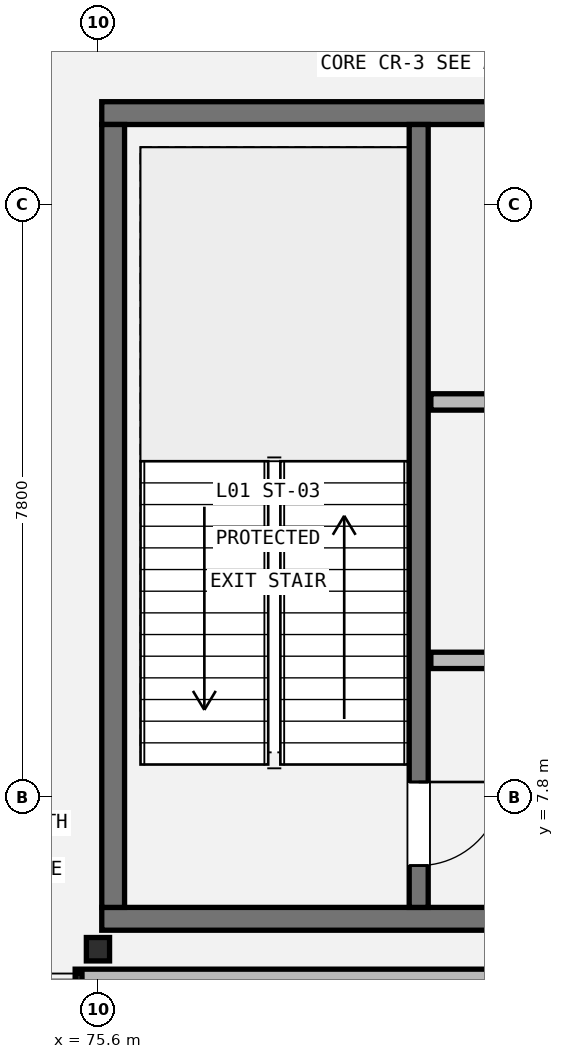
"""IFC4 building model, lengths in metres.
Left out: names, types, materials, properties, quantities, classifications, styles, units other than length and angle.
Written with IfcOpenShell. Run it as: python <this file> out.ifc"""

import sys

from ifc_helpers import new_model, si_unit, direction, frame, frame_2d, origin, origin_2d, place, context, subcontext, project, spatial, rectangle, i_section, extrude, element, fill, save


model = new_model("IFC4")
c1 = context("Model", 3, precision=1e-05, world=origin(), true_north=direction((0.0, 1.0)))
c2 = subcontext(c1, "Body", "Model", "MODEL_VIEW")
j1 = project(units=[si_unit("LENGTHUNIT", "METRE"), si_unit("PLANEANGLEUNIT", "RADIAN")], contexts=[c1])
p1 = place(None, origin())
s1 = spatial("IfcSite", under=j1, at=p1, CompositionType="ELEMENT")
p2 = place(p1, origin())
s2 = spatial("IfcBuilding", under=s1, at=p2, CompositionType="ELEMENT")
p3 = place(p2, frame((0.0, 0.0, 5.4)))
s3 = spatial("IfcBuildingStorey", under=s2, at=p3, CompositionType="ELEMENT", Elevation=5.4)
p4 = place(p3, frame((75.6, 5.8, 0.0), z_axis=(0.0, 0.0, 1.0), x_axis=(1.0, 0.0, 0.0)))
e1 = element("IfcColumn", 1, at=p4, inside=s3, PredefinedType="COLUMN", context=c2, shape_type="SweptSolid", body=[
    extrude(i_section(OverallWidth=0.305, OverallDepth=0.308, WebThickness=0.01, FlangeThickness=0.015, FilletRadius=0.015, at=origin_2d()), origin(), (0.0, 0.0, 1.0), 4.8),
])
p5 = place(p3, frame((84.3, 5.4, 0.0), z_axis=(0.0, 0.0, 1.0), x_axis=(-1.0, 0.0, 0.0)))
e2 = element("IfcWall", 2, at=p5, inside=s3, PredefinedType="STANDARD", context=c2, shape_type="SweptSolid", body=[
    extrude(rectangle(XDim=9.0, YDim=0.275, at=frame_2d((4.5, 0.0))), origin(), (0.0, 0.0, 1.0), 4.013),
])
for number, where, z_axis, x_axis in (
    (3, (84.15, 6.2, 0.0), (0.0, 0.0, 1.0), (-1.0, 0.0, 0.0)),
    (4, (75.65, 16.8, 0.0), (0.0, 0.0, 1.0), (1.0, 0.0, 0.0)),
):
    element("IfcWall", number, at=place(p3, frame(where, z_axis=z_axis, x_axis=x_axis)), inside=s3, PredefinedType="SHEAR", context=c2, shape_type="SweptSolid", body=[
        extrude(rectangle(XDim=8.5, YDim=0.3, at=frame_2d((4.25, 0.0))), origin(), (0.0, 0.0, 1.0), 4.58),
    ])
p6 = place(p3, frame((75.8, 6.35, 0.0), z_axis=(0.0, 0.0, 1.0), x_axis=(0.0, 1.0, 0.0)))
e5 = element("IfcWall", 5, at=p6, inside=s3, PredefinedType="SHEAR", context=c2, shape_type="SweptSolid", body=[
    extrude(rectangle(XDim=10.3, YDim=0.3, at=frame_2d((5.15, 0.0))), origin(), (0.0, 0.0, 1.0), 4.58),
])
p7 = place(p3, frame((79.82, 16.65, 0.0), z_axis=(0.0, 0.0, 1.0), x_axis=(0.0, -1.0, 0.0)))
e6 = element("IfcWall", 6, at=p7, inside=s3, PredefinedType="SHEAR", context=c2, shape_type="SweptSolid", body=[
    extrude(rectangle(XDim=10.3, YDim=0.25, at=frame_2d((5.15, 0.0))), origin(), (0.0, 0.0, 1.0), 4.58),
])
p8 = place(p7, frame((8.65, 0.0, 0.0)))
e7 = element("IfcOpeningElement", 7, at=p8, cuts=e6, PredefinedType="OPENING", context=c2, shape_type="SweptSolid", body=[
    extrude(rectangle(XDim=1.1, YDim=2.15, at=frame_2d((0.55, 1.075))), frame((0.0, 0.135, 0.0), z_axis=(0.0, -1.0, 0.0), x_axis=(1.0, 0.0, 0.0)), (0.0, 0.0, 1.0), 0.27),
])
p9 = place(p3, frame((79.98, 9.6, 0.0), z_axis=(0.0, 0.0, 1.0), x_axis=(1.0, 0.0, 0.0)))
e8 = element("IfcWall", 8, at=p9, inside=s3, PredefinedType="STANDARD", context=c2, shape_type="SweptSolid", body=[
    extrude(rectangle(XDim=3.85, YDim=0.215, at=frame_2d((1.925, 0.0))), origin(), (0.0, 0.0, 1.0), 3.955),
])
p10 = place(p9, frame((1.4, 0.0, 0.0)))
e9 = element("IfcOpeningElement", 9, at=p10, cuts=e8, PredefinedType="OPENING", context=c2, shape_type="SweptSolid", body=[
    extrude(rectangle(XDim=1.05, YDim=2.15, at=frame_2d((0.525, 1.075))), frame((0.0, 0.117, 0.0), z_axis=(0.0, -1.0, 0.0), x_axis=(1.0, 0.0, 0.0)), (0.0, 0.0, 1.0), 0.235),
])
p11 = place(p3, frame((79.98, 13.0, 0.0), z_axis=(0.0, 0.0, 1.0), x_axis=(1.0, 0.0, 0.0)))
e10 = element("IfcWall", 10, at=p11, inside=s3, PredefinedType="STANDARD", context=c2, shape_type="SweptSolid", body=[
    extrude(rectangle(XDim=3.85, YDim=0.215, at=frame_2d((1.925, 0.0))), origin(), (0.0, 0.0, 1.0), 3.955),
])
p12 = place(p11, frame((1.4, 0.0, 0.0)))
e11 = element("IfcOpeningElement", 11, at=p12, cuts=e10, PredefinedType="OPENING", context=c2, shape_type="SweptSolid", body=[
    extrude(rectangle(XDim=1.05, YDim=2.15, at=frame_2d((0.525, 1.075))), frame((0.0, 0.117, 0.0), z_axis=(0.0, -1.0, 0.0), x_axis=(1.0, 0.0, 0.0)), (0.0, 0.0, 1.0), 0.235),
])
p13 = place(p8, origin())
e12 = element("IfcDoor", 12, at=p13, inside=s3, OperationType="SINGLE_SWING_LEFT", PredefinedType="DOOR", context=c2, shape_type="SweptSolid", body=[
    extrude(rectangle(XDim=1.1, YDim=2.15, at=frame_2d((0.55, 1.075))), frame((0.0, 0.025, 0.0), z_axis=(0.0, -1.0, 0.0), x_axis=(1.0, 0.0, 0.0)), (0.0, 0.0, 1.0), 0.05),
])
fill(e7, e12)
save(model, sys.argv[1])
